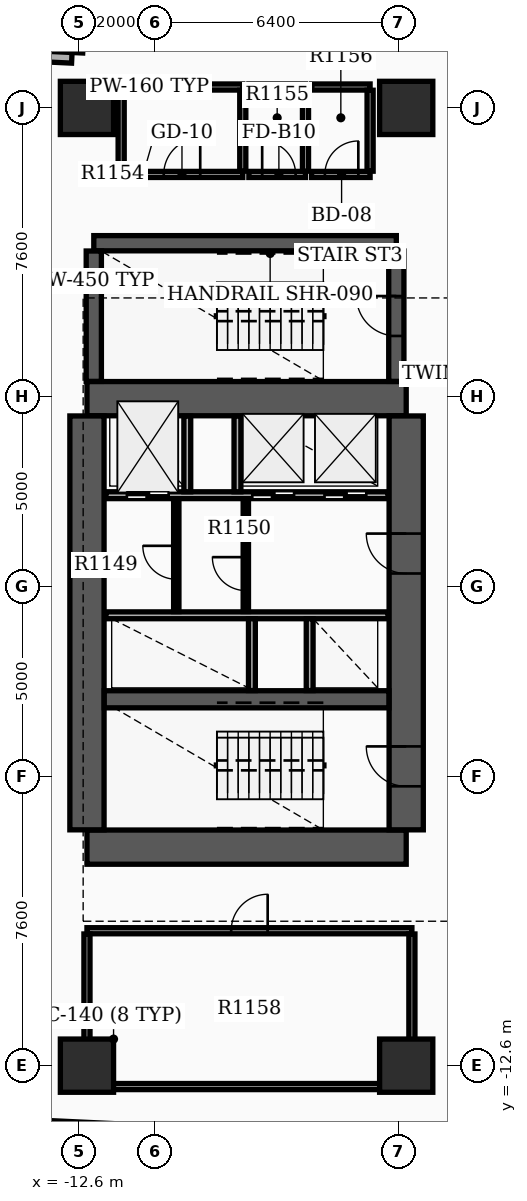
"""IFC4 building model, lengths in metres.
Left out: names, types, materials, properties, quantities, classifications, styles, units other than length and angle.
Written with IfcOpenShell. Run it as: python <this file> out.ifc"""

import sys

from ifc_helpers import new_model, si_unit, direction, frame, frame_2d, origin, origin_2d, place, context, subcontext, project, spatial, rectangle, extrude, element, fill, save


model = new_model("IFC4")
c1 = context("Model", 3, precision=1e-05, world=origin(), true_north=direction((0.0, 1.0)))
c2 = subcontext(c1, "Body", "Model", "MODEL_VIEW")
j1 = project(units=[si_unit("LENGTHUNIT", "METRE"), si_unit("PLANEANGLEUNIT", "RADIAN")], contexts=[c1])
p1 = place(None, origin())
s1 = spatial("IfcSite", under=j1, at=p1, CompositionType="ELEMENT")
p2 = place(p1, origin())
s2 = spatial("IfcBuilding", under=s1, at=p2, CompositionType="ELEMENT")
p3 = place(p2, frame((0.0, 0.0, 75.6)))
s3 = spatial("IfcBuildingStorey", under=s2, at=p3, CompositionType="ELEMENT", Elevation=75.6)
for number, where, z_axis, x_axis in (
    (1, (-12.4, -6.85, 0.0), (0.0, 0.0, 1.0), (1.0, 0.0, 0.0)),
    (2, (-12.4, 4.95, 0.0), (0.0, 0.0, 1.0), (1.0, 0.0, 0.0)),
):
    element("IfcWall", number, at=place(p3, frame(where, z_axis=z_axis, x_axis=x_axis)), inside=s3, PredefinedType="SHEAR", context=c2, shape_type="SweptSolid", body=[
        extrude(rectangle(XDim=8.4, YDim=0.9, at=frame_2d((4.2, 0.0))), origin(), (0.0, 0.0, 1.0), 3.7),
    ])
p4 = place(p3, frame((-12.4, -6.395, 0.0), z_axis=(0.0, 0.0, 1.0), x_axis=(0.0, 1.0, 0.0)))
e3 = element("IfcWall", 3, at=p4, inside=s3, PredefinedType="SHEAR", context=c2, shape_type="SweptSolid", body=[
    extrude(rectangle(XDim=10.89, YDim=0.9, at=frame_2d((5.445, 0.0))), origin(), (0.0, 0.0, 1.0), 3.7),
])
p5 = place(p3, frame((-4.0, -6.395, 0.0), z_axis=(0.0, 0.0, 1.0), x_axis=(0.0, 1.0, 0.0)))
e4 = element("IfcWall", 4, at=p5, inside=s3, PredefinedType="SHEAR", context=c2, shape_type="SweptSolid", body=[
    extrude(rectangle(XDim=10.89, YDim=0.9, at=frame_2d((5.445, 0.0))), origin(), (0.0, 0.0, 1.0), 3.7),
])
p6 = place(p5, frame((1.145, 0.0, 0.0)))
e5 = element("IfcOpeningElement", 5, at=p6, cuts=e4, PredefinedType="OPENING", context=c2, shape_type="SweptSolid", body=[
    extrude(rectangle(XDim=1.05, YDim=2.15, at=frame_2d((0.525, 1.075))), frame((0.0, 0.46, 0.0), z_axis=(0.0, -1.0, 0.0), x_axis=(1.0, 0.0, 0.0)), (0.0, 0.0, 1.0), 0.92),
])
p7 = place(p5, frame((6.745, 0.0, 0.0)))
e6 = element("IfcOpeningElement", 6, at=p7, cuts=e4, PredefinedType="OPENING", context=c2, shape_type="SweptSolid", body=[
    extrude(rectangle(XDim=1.05, YDim=2.15, at=frame_2d((0.525, 1.075))), frame((0.0, 0.46, 0.0), z_axis=(0.0, -1.0, 0.0), x_axis=(1.0, 0.0, 0.0)), (0.0, 0.0, 1.0), 0.92),
])
p8 = place(p3, frame((-11.945, -2.96, 0.0), z_axis=(0.0, 0.0, 1.0), x_axis=(1.0, 0.0, 0.0)))
e7 = element("IfcWall", 7, at=p8, inside=s3, PredefinedType="SHEAR", context=c2, shape_type="SweptSolid", body=[
    extrude(rectangle(XDim=7.49, YDim=0.45, at=frame_2d((3.745, 0.0))), origin(), (0.0, 0.0, 1.0), 3.7),
])
p9 = place(p3, frame((-12.22, 9.04, 0.0), z_axis=(0.0, 0.0, 1.0), x_axis=(1.0, 0.0, 0.0)))
e8 = element("IfcWall", 8, at=p9, inside=s3, PredefinedType="SHEAR", context=c2, shape_type="SweptSolid", body=[
    extrude(rectangle(XDim=7.96, YDim=0.4, at=frame_2d((3.98, 0.0))), origin(), (0.0, 0.0, 1.0), 3.7),
])
p10 = place(p3, frame((-12.22, 5.405, 0.0), z_axis=(0.0, 0.0, 1.0), x_axis=(0.0, 1.0, 0.0)))
e9 = element("IfcWall", 9, at=p10, inside=s3, PredefinedType="SHEAR", context=c2, shape_type="SweptSolid", body=[
    extrude(rectangle(XDim=3.43, YDim=0.4, at=frame_2d((1.715, 0.0))), origin(), (0.0, 0.0, 1.0), 3.7),
])
p11 = place(p3, frame((-4.26, 5.405, 0.0), z_axis=(0.0, 0.0, 1.0), x_axis=(0.0, 1.0, 0.0)))
e10 = element("IfcWall", 10, at=p11, inside=s3, PredefinedType="SHEAR", context=c2, shape_type="SweptSolid", body=[
    extrude(rectangle(XDim=3.43, YDim=0.4, at=frame_2d((1.715, 0.0))), origin(), (0.0, 0.0, 1.0), 3.7),
])
p12 = place(p11, frame((1.195, 0.0, 0.0)))
e11 = element("IfcOpeningElement", 11, at=p12, cuts=e10, PredefinedType="OPENING", context=c2, shape_type="SweptSolid", body=[
    extrude(rectangle(XDim=1.05, YDim=2.15, at=frame_2d((0.525, 1.075))), frame((0.0, 0.21, 0.0), z_axis=(0.0, -1.0, 0.0), x_axis=(1.0, 0.0, 0.0)), (0.0, 0.0, 1.0), 0.42),
])
for number, where, z_axis, x_axis in (
    (12, (-12.4, -12.6, 0.0), (0.0, 0.0, 1.0), (1.0, 0.0, 0.0)),
    (13, (-12.4, 12.6, 0.0), (0.0, 0.0, 1.0), (1.0, 0.0, 0.0)),
    (14, (-4.0, -12.6, 0.0), (0.0, 0.0, 1.0), (1.0, 0.0, 0.0)),
    (15, (-4.0, 12.6, 0.0), (0.0, 0.0, 1.0), (1.0, 0.0, 0.0)),
):
    element("IfcColumn", number, at=place(p3, frame(where, z_axis=z_axis, x_axis=x_axis)), inside=s3, PredefinedType="COLUMN", context=c2, shape_type="SweptSolid", body=[
        extrude(rectangle(XDim=1.4, YDim=1.4, at=origin_2d()), origin(), (0.0, 0.0, 1.0), 3.9),
    ])
p13 = place(p3, frame((-14.017, 13.976, 0.0), z_axis=(0.0, 0.0, 1.0), x_axis=(0.998883930236, -0.047232339719, 0.0)))
e16 = element("IfcWall", 16, at=p13, inside=s3, PredefinedType="STANDARD", context=c2, shape_type="SweptSolid", body=[
    extrude(rectangle(XDim=1.22, YDim=0.28, at=frame_2d((0.61, 0.0))), origin(), (0.0, 0.0, 1.0), 2.91),
])
p14 = place(p3, frame((-12.652, 14.052, 0.0), z_axis=(0.0, 0.0, 1.0), x_axis=(0.047039284441, 0.99889304018, 0.0)))
e17 = element("IfcWall", 17, at=p14, inside=s3, PredefinedType="STANDARD", context=c2, shape_type="SweptSolid", body=[
    extrude(rectangle(XDim=1.5, YDim=0.28, at=frame_2d((0.75, 0.0))), origin(), (0.0, 0.0, 1.0), 2.91),
])
p15 = place(p3, frame((-13.843, -14.164, 0.0), z_axis=(0.0, 0.0, 1.0), x_axis=(0.998889082162, -0.047123258997, 0.0)))
e18 = element("IfcWall", 18, at=p15, inside=s3, PredefinedType="STANDARD", context=c2, shape_type="SweptSolid", body=[
    extrude(rectangle(XDim=6.3, YDim=0.28, at=frame_2d((3.15, 0.0))), origin(), (0.0, 0.0, 1.0), 2.91),
])
p16 = place(p3, frame((-11.9, 2.41, 0.0), z_axis=(0.0, 0.0, 1.0), x_axis=(1.0, 0.0, 0.0)))
e19 = element("IfcWall", 19, at=p16, inside=s3, PredefinedType="SOLIDWALL", context=c2, shape_type="SweptSolid", body=[
    extrude(rectangle(XDim=7.42, YDim=0.18, at=frame_2d((3.71, 0.0))), origin(), (0.0, 0.0, 1.0), 2.9),
])
p17 = place(p16, frame((0.55, 0.0, 0.0)))
e20 = element("IfcOpeningElement", 20, at=p17, cuts=e19, PredefinedType="OPENING", context=c2, shape_type="SweptSolid", body=[
    extrude(rectangle(XDim=1.1, YDim=2.15, at=frame_2d((0.55, 1.075))), frame((0.0, 0.1, 0.0), z_axis=(0.0, -1.0, 0.0), x_axis=(1.0, 0.0, 0.0)), (0.0, 0.0, 1.0), 0.2),
])
p18 = place(p16, frame((3.85, 0.0, 0.0)))
e21 = element("IfcOpeningElement", 21, at=p18, cuts=e19, PredefinedType="OPENING", context=c2, shape_type="SweptSolid", body=[
    extrude(rectangle(XDim=1.1, YDim=2.15, at=frame_2d((0.55, 1.075))), frame((0.0, 0.1, 0.0), z_axis=(0.0, -1.0, 0.0), x_axis=(1.0, 0.0, 0.0)), (0.0, 0.0, 1.0), 0.2),
])
p19 = place(p16, frame((5.75, 0.0, 0.0)))
e22 = element("IfcOpeningElement", 22, at=p19, cuts=e19, PredefinedType="OPENING", context=c2, shape_type="SweptSolid", body=[
    extrude(rectangle(XDim=1.1, YDim=2.15, at=frame_2d((0.55, 1.075))), frame((0.0, 0.1, 0.0), z_axis=(0.0, -1.0, 0.0), x_axis=(1.0, 0.0, 0.0)), (0.0, 0.0, 1.0), 0.2),
])
p20 = place(p3, frame((-11.9, -0.75, 0.0), z_axis=(0.0, 0.0, 1.0), x_axis=(1.0, 0.0, 0.0)))
e23 = element("IfcWall", 23, at=p20, inside=s3, PredefinedType="SOLIDWALL", context=c2, shape_type="SweptSolid", body=[
    extrude(rectangle(XDim=7.42, YDim=0.18, at=frame_2d((3.71, 0.0))), origin(), (0.0, 0.0, 1.0), 2.9),
])
for number, where, z_axis, x_axis in (
    (24, (-9.76, 2.5, 0.0), (0.0, 0.0, 1.0), (0.0, 1.0, 0.0)),
    (25, (-8.44, 2.5, 0.0), (0.0, 0.0, 1.0), (0.0, 1.0, 0.0)),
):
    element("IfcWall", number, at=place(p3, frame(where, z_axis=z_axis, x_axis=x_axis)), inside=s3, PredefinedType="SOLIDWALL", context=c2, shape_type="SweptSolid", body=[
        extrude(rectangle(XDim=1.99, YDim=0.18, at=frame_2d((0.995, 0.0))), origin(), (0.0, 0.0, 1.0), 2.9),
    ])
for number, where, z_axis, x_axis in (
    (26, (-8.06, -2.73, 0.0), (0.0, 0.0, 1.0), (0.0, 1.0, 0.0)),
    (27, (-6.54, -2.73, 0.0), (0.0, 0.0, 1.0), (0.0, 1.0, 0.0)),
):
    element("IfcWall", number, at=place(p3, frame(where, z_axis=z_axis, x_axis=x_axis)), inside=s3, PredefinedType="SOLIDWALL", context=c2, shape_type="SweptSolid", body=[
        extrude(rectangle(XDim=1.89, YDim=0.18, at=frame_2d((0.945, 0.0))), origin(), (0.0, 0.0, 1.0), 2.9),
    ])
p21 = place(p3, frame((-8.22, -0.65, 0.0), z_axis=(0.0, 0.0, 1.0), x_axis=(0.0, 1.0, 0.0)))
e28 = element("IfcWall", 28, at=p21, inside=s3, PredefinedType="SOLIDWALL", context=c2, shape_type="SweptSolid", body=[
    extrude(rectangle(XDim=2.96, YDim=0.14, at=frame_2d((1.48, 0.0))), origin(), (0.0, 0.0, 1.0), 2.9),
])
p22 = place(p21, frame((0.55, 0.0, 0.0)))
e29 = element("IfcOpeningElement", 29, at=p22, cuts=e28, PredefinedType="OPENING", context=c2, shape_type="SweptSolid", body=[
    extrude(rectangle(XDim=0.88, YDim=2.1, at=frame_2d((0.44, 1.05))), frame((0.0, 0.08, 0.0), z_axis=(0.0, -1.0, 0.0), x_axis=(1.0, 0.0, 0.0)), (0.0, 0.0, 1.0), 0.16),
])
p23 = place(p3, frame((-10.05, -0.652, 0.0), z_axis=(0.0, 0.0, 1.0), x_axis=(0.0, 1.0, 0.0)))
e30 = element("IfcWall", 30, at=p23, inside=s3, PredefinedType="PARTITIONING", context=c2, shape_type="SweptSolid", body=[
    extrude(rectangle(XDim=2.962, YDim=0.14, at=frame_2d((1.481, 0.0))), origin(), (0.0, 0.0, 1.0), 2.9),
])
p24 = place(p23, frame((0.85, 0.0, 0.0)))
e31 = element("IfcOpeningElement", 31, at=p24, cuts=e30, PredefinedType="OPENING", context=c2, shape_type="SweptSolid", body=[
    extrude(rectangle(XDim=0.88, YDim=2.1, at=frame_2d((0.44, 1.05))), frame((0.0, 0.08, 0.0), z_axis=(0.0, -1.0, 0.0), x_axis=(1.0, 0.0, 0.0)), (0.0, 0.0, 1.0), 0.16),
])
p25 = place(p3, frame((-11.5, 10.85, 0.0), z_axis=(0.0, 0.0, 1.0), x_axis=(1.0, 0.0, 0.0)))
e32 = element("IfcWall", 32, at=p25, inside=s3, PredefinedType="PARTITIONING", context=c2, shape_type="SweptSolid", body=[
    extrude(rectangle(XDim=3.2, YDim=0.16, at=frame_2d((1.6, 0.0))), origin(), (0.0, 0.0, 1.0), 2.9),
])
p26 = place(p25, frame((1.12, 0.0, 0.0)))
e33 = element("IfcOpeningElement", 33, at=p26, cuts=e32, PredefinedType="OPENING", context=c2, shape_type="SweptSolid", body=[
    extrude(rectangle(XDim=0.96, YDim=2.15, at=frame_2d((0.48, 1.075))), frame((0.0, 0.09, 0.0), z_axis=(0.0, -1.0, 0.0), x_axis=(1.0, 0.0, 0.0)), (0.0, 0.0, 1.0), 0.18),
])
p27 = place(p3, frame((-11.5, 13.15, 0.0), z_axis=(0.0, 0.0, 1.0), x_axis=(1.0, 0.0, 0.0)))
e34 = element("IfcWall", 34, at=p27, inside=s3, PredefinedType="PARTITIONING", context=c2, shape_type="SweptSolid", body=[
    extrude(rectangle(XDim=3.2, YDim=0.16, at=frame_2d((1.6, 0.0))), origin(), (0.0, 0.0, 1.0), 2.9),
])
for number, where, z_axis, x_axis in (
    (35, (-11.5, 10.935, 0.0), (0.0, 0.0, 1.0), (0.0, 1.0, 0.0)),
    (36, (-8.3, 10.935, 0.0), (0.0, 0.0, 1.0), (0.0, 1.0, 0.0)),
):
    element("IfcWall", number, at=place(p3, frame(where, z_axis=z_axis, x_axis=x_axis)), inside=s3, PredefinedType="PARTITIONING", context=c2, shape_type="SweptSolid", body=[
        extrude(rectangle(XDim=2.13, YDim=0.16, at=frame_2d((1.065, 0.0))), origin(), (0.0, 0.0, 1.0), 2.9),
    ])
p28 = place(p3, frame((-8.14, 10.85, 0.0), z_axis=(0.0, 0.0, 1.0), x_axis=(1.0, 0.0, 0.0)))
e37 = element("IfcWall", 37, at=p28, inside=s3, PredefinedType="PARTITIONING", context=c2, shape_type="SweptSolid", body=[
    extrude(rectangle(XDim=1.49, YDim=0.16, at=frame_2d((0.745, 0.0))), origin(), (0.0, 0.0, 1.0), 2.9),
])
p29 = place(p28, frame((0.35, 0.0, 0.0)))
e38 = element("IfcOpeningElement", 38, at=p29, cuts=e37, PredefinedType="OPENING", context=c2, shape_type="SweptSolid", body=[
    extrude(rectangle(XDim=0.88, YDim=2.1, at=frame_2d((0.44, 1.05))), frame((0.0, 0.09, 0.0), z_axis=(0.0, -1.0, 0.0), x_axis=(1.0, 0.0, 0.0)), (0.0, 0.0, 1.0), 0.18),
])
p30 = place(p3, frame((-8.14, 13.15, 0.0), z_axis=(0.0, 0.0, 1.0), x_axis=(1.0, 0.0, 0.0)))
e39 = element("IfcWall", 39, at=p30, inside=s3, PredefinedType="PARTITIONING", context=c2, shape_type="SweptSolid", body=[
    extrude(rectangle(XDim=1.49, YDim=0.16, at=frame_2d((0.745, 0.0))), origin(), (0.0, 0.0, 1.0), 2.9),
])
p31 = place(p3, frame((-6.65, 10.935, 0.0), z_axis=(0.0, 0.0, 1.0), x_axis=(0.0, 1.0, 0.0)))
e40 = element("IfcWall", 40, at=p31, inside=s3, PredefinedType="PARTITIONING", context=c2, shape_type="SweptSolid", body=[
    extrude(rectangle(XDim=2.13, YDim=0.16, at=frame_2d((1.065, 0.0))), origin(), (0.0, 0.0, 1.0), 2.9),
])
p32 = place(p3, frame((-6.49, 10.85, 0.0), z_axis=(0.0, 0.0, 1.0), x_axis=(1.0, 0.0, 0.0)))
e41 = element("IfcWall", 41, at=p32, inside=s3, PredefinedType="PARTITIONING", context=c2, shape_type="SweptSolid", body=[
    extrude(rectangle(XDim=1.54, YDim=0.16, at=frame_2d((0.77, 0.0))), origin(), (0.0, 0.0, 1.0), 2.9),
])
p33 = place(p32, frame((0.35, 0.0, 0.0)))
e42 = element("IfcOpeningElement", 42, at=p33, cuts=e41, PredefinedType="OPENING", context=c2, shape_type="SweptSolid", body=[
    extrude(rectangle(XDim=0.88, YDim=2.15, at=frame_2d((0.44, 1.075))), frame((0.0, 0.09, 0.0), z_axis=(0.0, -1.0, 0.0), x_axis=(1.0, 0.0, 0.0)), (0.0, 0.0, 1.0), 0.18),
])
p34 = place(p3, frame((-6.49, 13.15, 0.0), z_axis=(0.0, 0.0, 1.0), x_axis=(1.0, 0.0, 0.0)))
e43 = element("IfcWall", 43, at=p34, inside=s3, PredefinedType="PARTITIONING", context=c2, shape_type="SweptSolid", body=[
    extrude(rectangle(XDim=1.54, YDim=0.16, at=frame_2d((0.77, 0.0))), origin(), (0.0, 0.0, 1.0), 2.9),
])
p35 = place(p3, frame((-4.95, 10.935, 0.0), z_axis=(0.0, 0.0, 1.0), x_axis=(0.0, 1.0, 0.0)))
e44 = element("IfcWall", 44, at=p35, inside=s3, PredefinedType="PARTITIONING", context=c2, shape_type="SweptSolid", body=[
    extrude(rectangle(XDim=2.13, YDim=0.16, at=frame_2d((1.065, 0.0))), origin(), (0.0, 0.0, 1.0), 2.9),
])
p36 = place(p3, frame((-12.4, -13.15, 0.0), z_axis=(0.0, 0.0, 1.0), x_axis=(1.0, 0.0, 0.0)))
e45 = element("IfcWall", 45, at=p36, inside=s3, PredefinedType="PARTITIONING", context=c2, shape_type="SweptSolid", body=[
    extrude(rectangle(XDim=8.55, YDim=0.16, at=frame_2d((4.275, 0.0))), origin(), (0.0, 0.0, 1.0), 2.9),
])
p37 = place(p3, frame((-12.4, -9.05, 0.0), z_axis=(0.0, 0.0, 1.0), x_axis=(1.0, 0.0, 0.0)))
e46 = element("IfcWall", 46, at=p37, inside=s3, PredefinedType="PARTITIONING", context=c2, shape_type="SweptSolid", body=[
    extrude(rectangle(XDim=8.55, YDim=0.16, at=frame_2d((4.275, 0.0))), origin(), (0.0, 0.0, 1.0), 2.9),
])
p38 = place(p37, frame((3.795, 0.0, 0.0)))
e47 = element("IfcOpeningElement", 47, at=p38, cuts=e46, PredefinedType="OPENING", context=c2, shape_type="SweptSolid", body=[
    extrude(rectangle(XDim=0.96, YDim=2.15, at=frame_2d((0.48, 1.075))), frame((0.0, 0.09, 0.0), z_axis=(0.0, -1.0, 0.0), x_axis=(1.0, 0.0, 0.0)), (0.0, 0.0, 1.0), 0.18),
])
for number, where, z_axis, x_axis in (
    (48, (-12.4, -13.065, 0.0), (0.0, 0.0, 1.0), (0.0, 1.0, 0.0)),
    (49, (-3.85, -13.065, 0.0), (0.0, 0.0, 1.0), (0.0, 1.0, 0.0)),
):
    element("IfcWall", number, at=place(p3, frame(where, z_axis=z_axis, x_axis=x_axis)), inside=s3, PredefinedType="PARTITIONING", context=c2, shape_type="SweptSolid", body=[
        extrude(rectangle(XDim=3.93, YDim=0.16, at=frame_2d((1.965, 0.0))), origin(), (0.0, 0.0, 1.0), 2.9),
    ])
p39 = place(p6, origin())
e50 = element("IfcDoor", 50, at=p39, inside=s3, OperationType="SINGLE_SWING_RIGHT", PredefinedType="DOOR", context=c2, shape_type="SweptSolid", body=[
    extrude(rectangle(XDim=1.05, YDim=2.15, at=frame_2d((0.525, 1.075))), frame((0.0, 0.025, 0.0), z_axis=(0.0, -1.0, 0.0), x_axis=(1.0, 0.0, 0.0)), (0.0, 0.0, 1.0), 0.05),
])
fill(e5, e50)
p40 = place(p7, origin())
e51 = element("IfcDoor", 51, at=p40, inside=s3, OperationType="SINGLE_SWING_RIGHT", PredefinedType="DOOR", context=c2, shape_type="SweptSolid", body=[
    extrude(rectangle(XDim=1.05, YDim=2.15, at=frame_2d((0.525, 1.075))), frame((0.0, 0.025, 0.0), z_axis=(0.0, -1.0, 0.0), x_axis=(1.0, 0.0, 0.0)), (0.0, 0.0, 1.0), 0.05),
])
fill(e6, e51)
p41 = place(p12, origin())
e52 = element("IfcDoor", 52, at=p41, inside=s3, OperationType="SINGLE_SWING_RIGHT", PredefinedType="DOOR", context=c2, shape_type="SweptSolid", body=[
    extrude(rectangle(XDim=1.05, YDim=2.15, at=frame_2d((0.525, 1.075))), frame((0.0, 0.025, 0.0), z_axis=(0.0, -1.0, 0.0), x_axis=(1.0, 0.0, 0.0)), (0.0, 0.0, 1.0), 0.05),
])
fill(e11, e52)
p42 = place(p17, origin())
e53 = element("IfcDoor", 53, at=p42, inside=s3, OperationType="DOUBLE_DOOR_SLIDING", PredefinedType="DOOR", context=c2, shape_type="SweptSolid", body=[
    extrude(rectangle(XDim=1.1, YDim=2.15, at=frame_2d((0.55, 1.075))), frame((0.0, 0.025, 0.0), z_axis=(0.0, -1.0, 0.0), x_axis=(1.0, 0.0, 0.0)), (0.0, 0.0, 1.0), 0.05),
])
fill(e20, e53)
p43 = place(p18, origin())
e54 = element("IfcDoor", 54, at=p43, inside=s3, OperationType="DOUBLE_DOOR_SLIDING", PredefinedType="DOOR", context=c2, shape_type="SweptSolid", body=[
    extrude(rectangle(XDim=1.1, YDim=2.15, at=frame_2d((0.55, 1.075))), frame((0.0, 0.025, 0.0), z_axis=(0.0, -1.0, 0.0), x_axis=(1.0, 0.0, 0.0)), (0.0, 0.0, 1.0), 0.05),
])
fill(e21, e54)
p44 = place(p19, origin())
e55 = element("IfcDoor", 55, at=p44, inside=s3, OperationType="DOUBLE_DOOR_SLIDING", PredefinedType="DOOR", context=c2, shape_type="SweptSolid", body=[
    extrude(rectangle(XDim=1.1, YDim=2.15, at=frame_2d((0.55, 1.075))), frame((0.0, 0.025, 0.0), z_axis=(0.0, -1.0, 0.0), x_axis=(1.0, 0.0, 0.0)), (0.0, 0.0, 1.0), 0.05),
])
fill(e22, e55)
p45 = place(p22, origin())
e56 = element("IfcDoor", 56, at=p45, inside=s3, OperationType="SINGLE_SWING_RIGHT", PredefinedType="DOOR", context=c2, shape_type="SweptSolid", body=[
    extrude(rectangle(XDim=0.88, YDim=2.1, at=frame_2d((0.44, 1.05))), frame((0.0, 0.025, 0.0), z_axis=(0.0, -1.0, 0.0), x_axis=(1.0, 0.0, 0.0)), (0.0, 0.0, 1.0), 0.05),
])
fill(e29, e56)
p46 = place(p24, origin())
e57 = element("IfcDoor", 57, at=p46, inside=s3, OperationType="SINGLE_SWING_RIGHT", PredefinedType="DOOR", context=c2, shape_type="SweptSolid", body=[
    extrude(rectangle(XDim=0.88, YDim=2.1, at=frame_2d((0.44, 1.05))), frame((0.0, 0.025, 0.0), z_axis=(0.0, -1.0, 0.0), x_axis=(1.0, 0.0, 0.0)), (0.0, 0.0, 1.0), 0.05),
])
fill(e31, e57)
p47 = place(p26, origin())
e58 = element("IfcDoor", 58, at=p47, inside=s3, OperationType="SINGLE_SWING_RIGHT", PredefinedType="DOOR", context=c2, shape_type="SweptSolid", body=[
    extrude(rectangle(XDim=0.96, YDim=2.15, at=frame_2d((0.48, 1.075))), frame((0.0, 0.025, 0.0), z_axis=(0.0, -1.0, 0.0), x_axis=(1.0, 0.0, 0.0)), (0.0, 0.0, 1.0), 0.05),
])
fill(e33, e58)
p48 = place(p29, origin())
e59 = element("IfcDoor", 59, at=p48, inside=s3, OperationType="SINGLE_SWING_LEFT", PredefinedType="DOOR", context=c2, shape_type="SweptSolid", body=[
    extrude(rectangle(XDim=0.88, YDim=2.1, at=frame_2d((0.44, 1.05))), frame((0.0, 0.025, 0.0), z_axis=(0.0, -1.0, 0.0), x_axis=(1.0, 0.0, 0.0)), (0.0, 0.0, 1.0), 0.05),
])
fill(e38, e59)
p49 = place(p33, origin())
e60 = element("IfcDoor", 60, at=p49, inside=s3, OperationType="SINGLE_SWING_RIGHT", PredefinedType="DOOR", context=c2, shape_type="SweptSolid", body=[
    extrude(rectangle(XDim=0.88, YDim=2.15, at=frame_2d((0.44, 1.075))), frame((0.0, 0.025, 0.0), z_axis=(0.0, -1.0, 0.0), x_axis=(1.0, 0.0, 0.0)), (0.0, 0.0, 1.0), 0.05),
])
fill(e42, e60)
p50 = place(p38, origin())
e61 = element("IfcDoor", 61, at=p50, inside=s3, OperationType="SINGLE_SWING_RIGHT", PredefinedType="DOOR", context=c2, shape_type="SweptSolid", body=[
    extrude(rectangle(XDim=0.96, YDim=2.15, at=frame_2d((0.48, 1.075))), frame((0.0, 0.025, 0.0), z_axis=(0.0, -1.0, 0.0), x_axis=(1.0, 0.0, 0.0)), (0.0, 0.0, 1.0), 0.05),
])
fill(e47, e61)
save(model, sys.argv[1])
